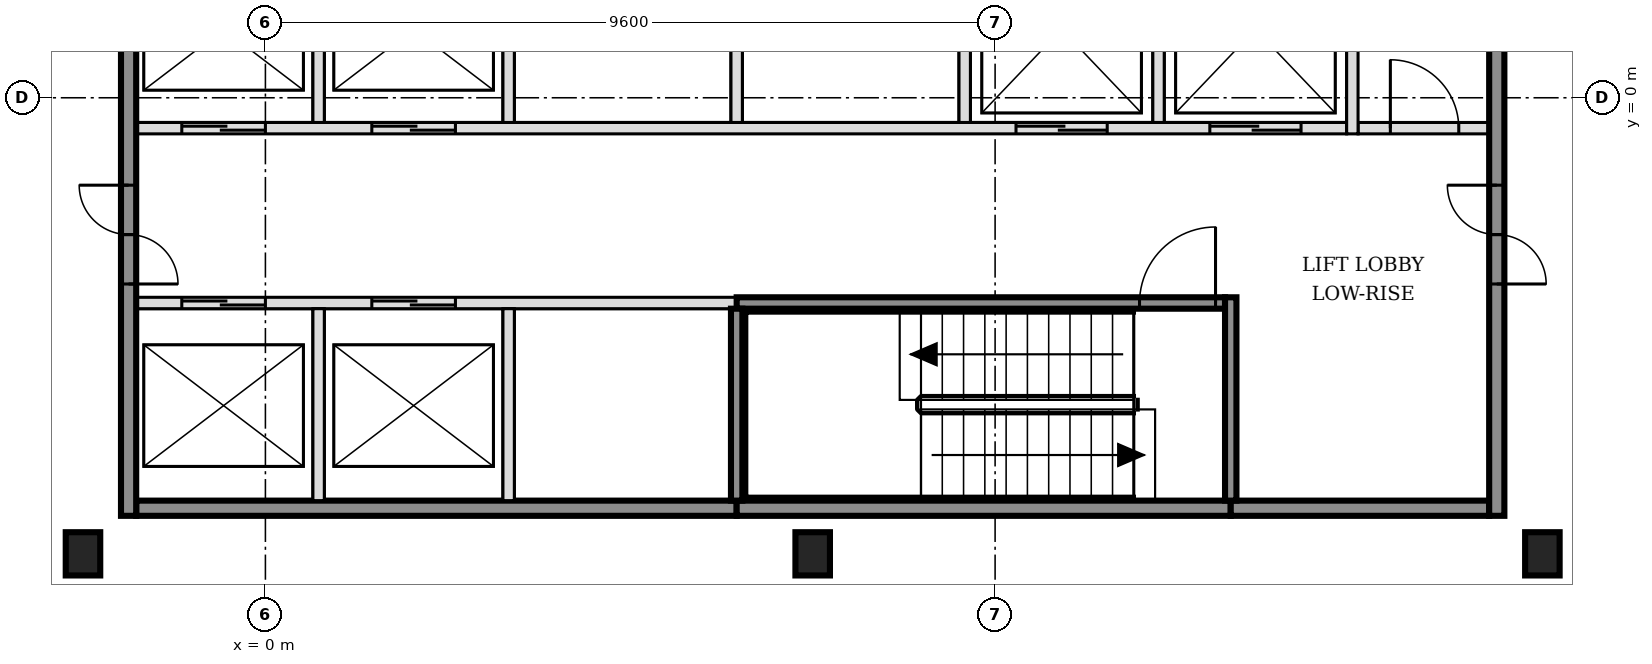
"""IFC4 building model, lengths in metres.
Left out: names, types, materials, properties, quantities, classifications, styles, units other than length and angle.
Written with IfcOpenShell. Run it as: python <this file> out.ifc"""

import sys

from ifc_helpers import new_model, si_unit, direction, frame, frame_2d, origin, origin_2d, place, context, subcontext, project, spatial, rectangle, i_section, extrude, element, fill, save


model = new_model("IFC4")
c1 = context("Model", 3, precision=1e-05, world=origin(), true_north=direction((0.0, 1.0)))
c2 = subcontext(c1, "Body", "Model", "MODEL_VIEW")
j1 = project(units=[si_unit("LENGTHUNIT", "METRE"), si_unit("PLANEANGLEUNIT", "RADIAN")], contexts=[c1])
p1 = place(None, origin())
s1 = spatial("IfcSite", under=j1, at=p1, CompositionType="ELEMENT")
p2 = place(p1, origin())
s2 = spatial("IfcBuilding", under=s1, at=p2, CompositionType="ELEMENT")
p3 = place(p2, frame((0.0, 0.0, 51.0)))
s3 = spatial("IfcBuildingStorey", under=s2, at=p3, CompositionType="ELEMENT", Elevation=51.0)
for number, where, z_axis, x_axis in (
    (1, (-2.4, -6.0, -0.15), (0.0, 0.0, 1.0), (1.0, 0.0, 0.0)),
    (2, (7.2, -6.0, -0.15), (0.0, 0.0, 1.0), (1.0, 0.0, 0.0)),
    (3, (16.8, -6.0, -0.15), (0.0, 0.0, 1.0), (1.0, 0.0, 0.0)),
):
    element("IfcColumn", number, at=place(p3, frame(where, z_axis=z_axis, x_axis=x_axis)), inside=s3, PredefinedType="COLUMN", context=c2, shape_type="SweptSolid", body=[
        extrude(i_section(OverallWidth=0.454, OverallDepth=0.569, WebThickness=0.078, FlangeThickness=0.125, FilletRadius=0.015, at=origin_2d()), origin(), (0.0, 0.0, 1.0), 3.6),
    ])
p4 = place(p3, frame((-1.7, -5.4, 0.0), z_axis=(0.0, 0.0, 1.0), x_axis=(1.0, 0.0, 0.0)))
e4 = element("IfcWall", 4, at=p4, inside=s3, PredefinedType="SOLIDWALL", context=c2, shape_type="SweptSolid", body=[
    extrude(rectangle(XDim=7.9, YDim=0.2, at=frame_2d((3.95, 0.0))), origin(), (0.0, 0.0, 1.0), 3.45),
])
p5 = place(p3, frame((6.2, -5.4, 0.0), z_axis=(0.0, 0.0, 1.0), x_axis=(1.0, 0.0, 0.0)))
e5 = element("IfcWall", 5, at=p5, inside=s3, PredefinedType="SOLIDWALL", context=c2, shape_type="SweptSolid", body=[
    extrude(rectangle(XDim=6.5, YDim=0.2, at=frame_2d((3.25, 0.0))), origin(), (0.0, 0.0, 1.0), 3.45),
])
p6 = place(p3, frame((12.7, -5.4, 0.0), z_axis=(0.0, 0.0, 1.0), x_axis=(1.0, 0.0, 0.0)))
e6 = element("IfcWall", 6, at=p6, inside=s3, PredefinedType="SOLIDWALL", context=c2, shape_type="SweptSolid", body=[
    extrude(rectangle(XDim=3.4, YDim=0.2, at=frame_2d((1.7, 0.0))), origin(), (0.0, 0.0, 1.0), 3.45),
])
p7 = place(p3, frame((-1.7, -2.7, 0.0), z_axis=(0.0, 0.0, 1.0), x_axis=(1.0, 0.0, 0.0)))
e7 = element("IfcWall", 7, at=p7, inside=s3, PredefinedType="SOLIDWALL", context=c2, shape_type="SweptSolid", body=[
    extrude(rectangle(XDim=7.9, YDim=0.15, at=frame_2d((3.95, 0.0))), origin(), (0.0, 0.0, 1.0), 3.45),
])
p8 = place(p7, frame((0.6, 0.0, 0.0)))
e8 = element("IfcOpeningElement", 8, at=p8, cuts=e7, PredefinedType="OPENING", context=c2, shape_type="SweptSolid", body=[
    extrude(rectangle(XDim=1.1, YDim=2.1, at=frame_2d((0.55, 1.05))), frame((0.0, 0.085, 0.0), z_axis=(0.0, -1.0, 0.0), x_axis=(1.0, 0.0, 0.0)), (0.0, 0.0, 1.0), 0.17),
])
p9 = place(p7, frame((3.1, 0.0, 0.0)))
e9 = element("IfcOpeningElement", 9, at=p9, cuts=e7, PredefinedType="OPENING", context=c2, shape_type="SweptSolid", body=[
    extrude(rectangle(XDim=1.1, YDim=2.1, at=frame_2d((0.55, 1.05))), frame((0.0, 0.085, 0.0), z_axis=(0.0, -1.0, 0.0), x_axis=(1.0, 0.0, 0.0)), (0.0, 0.0, 1.0), 0.17),
])
p10 = place(p3, frame((6.2, -2.7, 0.0), z_axis=(0.0, 0.0, 1.0), x_axis=(1.0, 0.0, 0.0)))
e10 = element("IfcWall", 10, at=p10, inside=s3, PredefinedType="SOLIDWALL", context=c2, shape_type="SweptSolid", body=[
    extrude(rectangle(XDim=6.425, YDim=0.15, at=frame_2d((3.212, 0.0))), origin(), (0.0, 0.0, 1.0), 3.45),
])
p11 = place(p10, frame((5.3, 0.0, 0.0)))
e11 = element("IfcOpeningElement", 11, at=p11, cuts=e10, PredefinedType="OPENING", context=c2, shape_type="SweptSolid", body=[
    extrude(rectangle(XDim=1.0, YDim=2.1, at=frame_2d((0.5, 1.05))), frame((0.0, 0.085, 0.0), z_axis=(0.0, -1.0, 0.0), x_axis=(1.0, 0.0, 0.0)), (0.0, 0.0, 1.0), 0.17),
])
p12 = place(p3, frame((-1.7, -0.4, 0.0), z_axis=(0.0, 0.0, 1.0), x_axis=(1.0, 0.0, 0.0)))
e12 = element("IfcWall", 12, at=p12, inside=s3, PredefinedType="SOLIDWALL", context=c2, shape_type="SweptSolid", body=[
    extrude(rectangle(XDim=15.925, YDim=0.15, at=frame_2d((7.962, 0.0))), origin(), (0.0, 0.0, 1.0), 3.45),
])
p13 = place(p12, frame((0.6, 0.0, 0.0)))
e13 = element("IfcOpeningElement", 13, at=p13, cuts=e12, PredefinedType="OPENING", context=c2, shape_type="SweptSolid", body=[
    extrude(rectangle(XDim=1.1, YDim=2.1, at=frame_2d((0.55, 1.05))), frame((0.0, 0.085, 0.0), z_axis=(0.0, -1.0, 0.0), x_axis=(1.0, 0.0, 0.0)), (0.0, 0.0, 1.0), 0.17),
])
p14 = place(p12, frame((3.1, 0.0, 0.0)))
e14 = element("IfcOpeningElement", 14, at=p14, cuts=e12, PredefinedType="OPENING", context=c2, shape_type="SweptSolid", body=[
    extrude(rectangle(XDim=1.1, YDim=2.1, at=frame_2d((0.55, 1.05))), frame((0.0, 0.085, 0.0), z_axis=(0.0, -1.0, 0.0), x_axis=(1.0, 0.0, 0.0)), (0.0, 0.0, 1.0), 0.17),
])
p15 = place(p12, frame((11.575, 0.0, 0.0)))
e15 = element("IfcOpeningElement", 15, at=p15, cuts=e12, PredefinedType="OPENING", context=c2, shape_type="SweptSolid", body=[
    extrude(rectangle(XDim=1.2, YDim=2.1, at=frame_2d((0.6, 1.05))), frame((0.0, 0.085, 0.0), z_axis=(0.0, -1.0, 0.0), x_axis=(1.0, 0.0, 0.0)), (0.0, 0.0, 1.0), 0.17),
])
p16 = place(p12, frame((14.125, 0.0, 0.0)))
e16 = element("IfcOpeningElement", 16, at=p16, cuts=e12, PredefinedType="OPENING", context=c2, shape_type="SweptSolid", body=[
    extrude(rectangle(XDim=1.2, YDim=2.1, at=frame_2d((0.6, 1.05))), frame((0.0, 0.085, 0.0), z_axis=(0.0, -1.0, 0.0), x_axis=(1.0, 0.0, 0.0)), (0.0, 0.0, 1.0), 0.17),
])
p17 = place(p3, frame((14.375, -0.4, 0.0), z_axis=(0.0, 0.0, 1.0), x_axis=(1.0, 0.0, 0.0)))
e17 = element("IfcWall", 17, at=p17, inside=s3, PredefinedType="PARTITIONING", context=c2, shape_type="SweptSolid", body=[
    extrude(rectangle(XDim=1.725, YDim=0.15, at=frame_2d((0.863, 0.0))), origin(), (0.0, 0.0, 1.0), 3.45),
])
p18 = place(p17, frame((0.425, 0.0, 0.0)))
e18 = element("IfcOpeningElement", 18, at=p18, cuts=e17, PredefinedType="OPENING", context=c2, shape_type="SweptSolid", body=[
    extrude(rectangle(XDim=0.9, YDim=2.1, at=frame_2d((0.45, 1.05))), frame((0.0, 0.085, 0.0), z_axis=(0.0, -1.0, 0.0), x_axis=(1.0, 0.0, 0.0)), (0.0, 0.0, 1.0), 0.17),
])
p19 = place(p3, frame((-1.8, -5.5, 0.0), z_axis=(0.0, 0.0, 1.0), x_axis=(0.0, 1.0, 0.0)))
e19 = element("IfcWall", 19, at=p19, inside=s3, PredefinedType="SOLIDWALL", context=c2, shape_type="SweptSolid", body=[
    extrude(rectangle(XDim=15.8, YDim=0.2, at=frame_2d((7.9, 0.0))), origin(), (0.0, 0.0, 1.0), 3.45),
])
p20 = place(p19, frame((3.05, 0.0, 0.0)))
e20 = element("IfcOpeningElement", 20, at=p20, cuts=e19, PredefinedType="OPENING", context=c2, shape_type="SweptSolid", body=[
    extrude(rectangle(XDim=1.3, YDim=2.1, at=frame_2d((0.65, 1.05))), frame((0.0, 0.11, 0.0), z_axis=(0.0, -1.0, 0.0), x_axis=(1.0, 0.0, 0.0)), (0.0, 0.0, 1.0), 0.22),
])
p21 = place(p19, frame((11.45, 0.0, 0.0)))
e21 = element("IfcOpeningElement", 21, at=p21, cuts=e19, PredefinedType="OPENING", context=c2, shape_type="SweptSolid", body=[
    extrude(rectangle(XDim=1.3, YDim=2.1, at=frame_2d((0.65, 1.05))), frame((0.0, 0.11, 0.0), z_axis=(0.0, -1.0, 0.0), x_axis=(1.0, 0.0, 0.0)), (0.0, 0.0, 1.0), 0.22),
])
p22 = place(p3, frame((0.7, -5.3, 0.0), z_axis=(0.0, 0.0, 1.0), x_axis=(0.0, 1.0, 0.0)))
e22 = element("IfcWall", 22, at=p22, inside=s3, PredefinedType="SOLIDWALL", context=c2, shape_type="SweptSolid", body=[
    extrude(rectangle(XDim=2.525, YDim=0.15, at=frame_2d((1.263, 0.0))), origin(), (0.0, 0.0, 1.0), 3.45),
])
p23 = place(p3, frame((0.7, -0.325, 0.0), z_axis=(0.0, 0.0, 1.0), x_axis=(0.0, 1.0, 0.0)))
e23 = element("IfcWall", 23, at=p23, inside=s3, PredefinedType="SOLIDWALL", context=c2, shape_type="SweptSolid", body=[
    extrude(rectangle(XDim=2.45, YDim=0.15, at=frame_2d((1.225, 0.0))), origin(), (0.0, 0.0, 1.0), 3.45),
])
p24 = place(p3, frame((3.2, -5.3, 0.0), z_axis=(0.0, 0.0, 1.0), x_axis=(0.0, 1.0, 0.0)))
e24 = element("IfcWall", 24, at=p24, inside=s3, PredefinedType="SOLIDWALL", context=c2, shape_type="SweptSolid", body=[
    extrude(rectangle(XDim=2.525, YDim=0.15, at=frame_2d((1.263, 0.0))), origin(), (0.0, 0.0, 1.0), 3.45),
])
p25 = place(p3, frame((3.2, -0.325, 0.0), z_axis=(0.0, 0.0, 1.0), x_axis=(0.0, 1.0, 0.0)))
e25 = element("IfcWall", 25, at=p25, inside=s3, PredefinedType="SOLIDWALL", context=c2, shape_type="SweptSolid", body=[
    extrude(rectangle(XDim=2.45, YDim=0.15, at=frame_2d((1.225, 0.0))), origin(), (0.0, 0.0, 1.0), 3.45),
])
p26 = place(p3, frame((6.2, -5.3, 0.0), z_axis=(0.0, 0.0, 1.0), x_axis=(0.0, 1.0, 0.0)))
e26 = element("IfcWall", 26, at=p26, inside=s3, PredefinedType="SOLIDWALL", context=c2, shape_type="SweptSolid", body=[
    extrude(rectangle(XDim=2.525, YDim=0.15, at=frame_2d((1.263, 0.0))), origin(), (0.0, 0.0, 1.0), 3.45),
])
for number, where, z_axis, x_axis in (
    (27, (6.2, -0.325, 0.0), (0.0, 0.0, 1.0), (0.0, 1.0, 0.0)),
    (28, (9.2, -0.325, 0.0), (0.0, 0.0, 1.0), (0.0, 1.0, 0.0)),
    (29, (11.75, -0.325, 0.0), (0.0, 0.0, 1.0), (0.0, 1.0, 0.0)),
):
    element("IfcWall", number, at=place(p3, frame(where, z_axis=z_axis, x_axis=x_axis)), inside=s3, PredefinedType="SOLIDWALL", context=c2, shape_type="SweptSolid", body=[
        extrude(rectangle(XDim=2.45, YDim=0.15, at=frame_2d((1.225, 0.0))), origin(), (0.0, 0.0, 1.0), 3.45),
    ])
p27 = place(p3, frame((12.7, -5.3, 0.0), z_axis=(0.0, 0.0, 1.0), x_axis=(0.0, 1.0, 0.0)))
e30 = element("IfcWall", 30, at=p27, inside=s3, PredefinedType="SOLIDWALL", context=c2, shape_type="SweptSolid", body=[
    extrude(rectangle(XDim=2.675, YDim=0.15, at=frame_2d((1.337, 0.0))), origin(), (0.0, 0.0, 1.0), 3.45),
])
p28 = place(p3, frame((14.3, -0.475, 0.0), z_axis=(0.0, 0.0, 1.0), x_axis=(0.0, 1.0, 0.0)))
e31 = element("IfcWall", 31, at=p28, inside=s3, PredefinedType="SOLIDWALL", context=c2, shape_type="SweptSolid", body=[
    extrude(rectangle(XDim=2.75, YDim=0.15, at=frame_2d((1.375, 0.0))), origin(), (0.0, 0.0, 1.0), 3.45),
])
p29 = place(p3, frame((16.2, -5.5, 0.0), z_axis=(0.0, 0.0, 1.0), x_axis=(0.0, 1.0, 0.0)))
e32 = element("IfcWall", 32, at=p29, inside=s3, PredefinedType="SOLIDWALL", context=c2, shape_type="SweptSolid", body=[
    extrude(rectangle(XDim=15.8, YDim=0.2, at=frame_2d((7.9, 0.0))), origin(), (0.0, 0.0, 1.0), 3.45),
])
p30 = place(p29, frame((3.05, 0.0, 0.0)))
e33 = element("IfcOpeningElement", 33, at=p30, cuts=e32, PredefinedType="OPENING", context=c2, shape_type="SweptSolid", body=[
    extrude(rectangle(XDim=1.3, YDim=2.1, at=frame_2d((0.65, 1.05))), frame((0.0, 0.11, 0.0), z_axis=(0.0, -1.0, 0.0), x_axis=(1.0, 0.0, 0.0)), (0.0, 0.0, 1.0), 0.22),
])
p31 = place(p29, frame((11.45, 0.0, 0.0)))
e34 = element("IfcOpeningElement", 34, at=p31, cuts=e32, PredefinedType="OPENING", context=c2, shape_type="SweptSolid", body=[
    extrude(rectangle(XDim=1.3, YDim=2.1, at=frame_2d((0.65, 1.05))), frame((0.0, 0.11, 0.0), z_axis=(0.0, -1.0, 0.0), x_axis=(1.0, 0.0, 0.0)), (0.0, 0.0, 1.0), 0.22),
])
p32 = place(p8, origin())
e35 = element("IfcDoor", 35, at=p32, inside=s3, OperationType="DOUBLE_DOOR_SLIDING", PredefinedType="DOOR", context=c2, shape_type="SweptSolid", body=[
    extrude(rectangle(XDim=1.1, YDim=2.1, at=frame_2d((0.55, 1.05))), frame((0.0, 0.025, 0.0), z_axis=(0.0, -1.0, 0.0), x_axis=(1.0, 0.0, 0.0)), (0.0, 0.0, 1.0), 0.05),
])
fill(e8, e35)
p33 = place(p9, origin())
e36 = element("IfcDoor", 36, at=p33, inside=s3, OperationType="DOUBLE_DOOR_SLIDING", PredefinedType="DOOR", context=c2, shape_type="SweptSolid", body=[
    extrude(rectangle(XDim=1.1, YDim=2.1, at=frame_2d((0.55, 1.05))), frame((0.0, 0.025, 0.0), z_axis=(0.0, -1.0, 0.0), x_axis=(1.0, 0.0, 0.0)), (0.0, 0.0, 1.0), 0.05),
])
fill(e9, e36)
p34 = place(p13, origin())
e37 = element("IfcDoor", 37, at=p34, inside=s3, OperationType="DOUBLE_DOOR_SLIDING", PredefinedType="DOOR", context=c2, shape_type="SweptSolid", body=[
    extrude(rectangle(XDim=1.1, YDim=2.1, at=frame_2d((0.55, 1.05))), frame((0.0, 0.025, 0.0), z_axis=(0.0, -1.0, 0.0), x_axis=(1.0, 0.0, 0.0)), (0.0, 0.0, 1.0), 0.05),
])
fill(e13, e37)
p35 = place(p14, origin())
e38 = element("IfcDoor", 38, at=p35, inside=s3, OperationType="DOUBLE_DOOR_SLIDING", PredefinedType="DOOR", context=c2, shape_type="SweptSolid", body=[
    extrude(rectangle(XDim=1.1, YDim=2.1, at=frame_2d((0.55, 1.05))), frame((0.0, 0.025, 0.0), z_axis=(0.0, -1.0, 0.0), x_axis=(1.0, 0.0, 0.0)), (0.0, 0.0, 1.0), 0.05),
])
fill(e14, e38)
p36 = place(p15, origin())
e39 = element("IfcDoor", 39, at=p36, inside=s3, OperationType="DOUBLE_DOOR_SLIDING", PredefinedType="DOOR", context=c2, shape_type="SweptSolid", body=[
    extrude(rectangle(XDim=1.2, YDim=2.1, at=frame_2d((0.6, 1.05))), frame((0.0, 0.025, 0.0), z_axis=(0.0, -1.0, 0.0), x_axis=(1.0, 0.0, 0.0)), (0.0, 0.0, 1.0), 0.05),
])
fill(e15, e39)
p37 = place(p16, origin())
e40 = element("IfcDoor", 40, at=p37, inside=s3, OperationType="DOUBLE_DOOR_SLIDING", PredefinedType="DOOR", context=c2, shape_type="SweptSolid", body=[
    extrude(rectangle(XDim=1.2, YDim=2.1, at=frame_2d((0.6, 1.05))), frame((0.0, 0.025, 0.0), z_axis=(0.0, -1.0, 0.0), x_axis=(1.0, 0.0, 0.0)), (0.0, 0.0, 1.0), 0.05),
])
fill(e16, e40)
p38 = place(p11, origin())
e41 = element("IfcDoor", 41, at=p38, inside=s3, OperationType="SINGLE_SWING_RIGHT", PredefinedType="DOOR", context=c2, shape_type="SweptSolid", body=[
    extrude(rectangle(XDim=1.0, YDim=2.1, at=frame_2d((0.5, 1.05))), frame((0.0, 0.025, 0.0), z_axis=(0.0, -1.0, 0.0), x_axis=(1.0, 0.0, 0.0)), (0.0, 0.0, 1.0), 0.05),
])
fill(e11, e41)
p39 = place(p20, origin())
e42 = element("IfcDoor", 42, at=p39, inside=s3, OperationType="DOUBLE_DOOR_SINGLE_SWING", PredefinedType="DOOR", context=c2, shape_type="SweptSolid", body=[
    extrude(rectangle(XDim=1.3, YDim=2.1, at=frame_2d((0.65, 1.05))), frame((0.0, 0.025, 0.0), z_axis=(0.0, -1.0, 0.0), x_axis=(1.0, 0.0, 0.0)), (0.0, 0.0, 1.0), 0.05),
])
fill(e20, e42)
p40 = place(p30, origin())
e43 = element("IfcDoor", 43, at=p40, inside=s3, OperationType="DOUBLE_DOOR_SINGLE_SWING", PredefinedType="DOOR", context=c2, shape_type="SweptSolid", body=[
    extrude(rectangle(XDim=1.3, YDim=2.1, at=frame_2d((0.65, 1.05))), frame((0.0, 0.025, 0.0), z_axis=(0.0, -1.0, 0.0), x_axis=(1.0, 0.0, 0.0)), (0.0, 0.0, 1.0), 0.05),
])
fill(e33, e43)
p41 = place(p18, origin())
e44 = element("IfcDoor", 44, at=p41, inside=s3, OperationType="SINGLE_SWING_LEFT", PredefinedType="DOOR", context=c2, shape_type="SweptSolid", body=[
    extrude(rectangle(XDim=0.9, YDim=2.1, at=frame_2d((0.45, 1.05))), frame((0.0, 0.025, 0.0), z_axis=(0.0, -1.0, 0.0), x_axis=(1.0, 0.0, 0.0)), (0.0, 0.0, 1.0), 0.05),
])
fill(e18, e44)
save(model, sys.argv[1])
